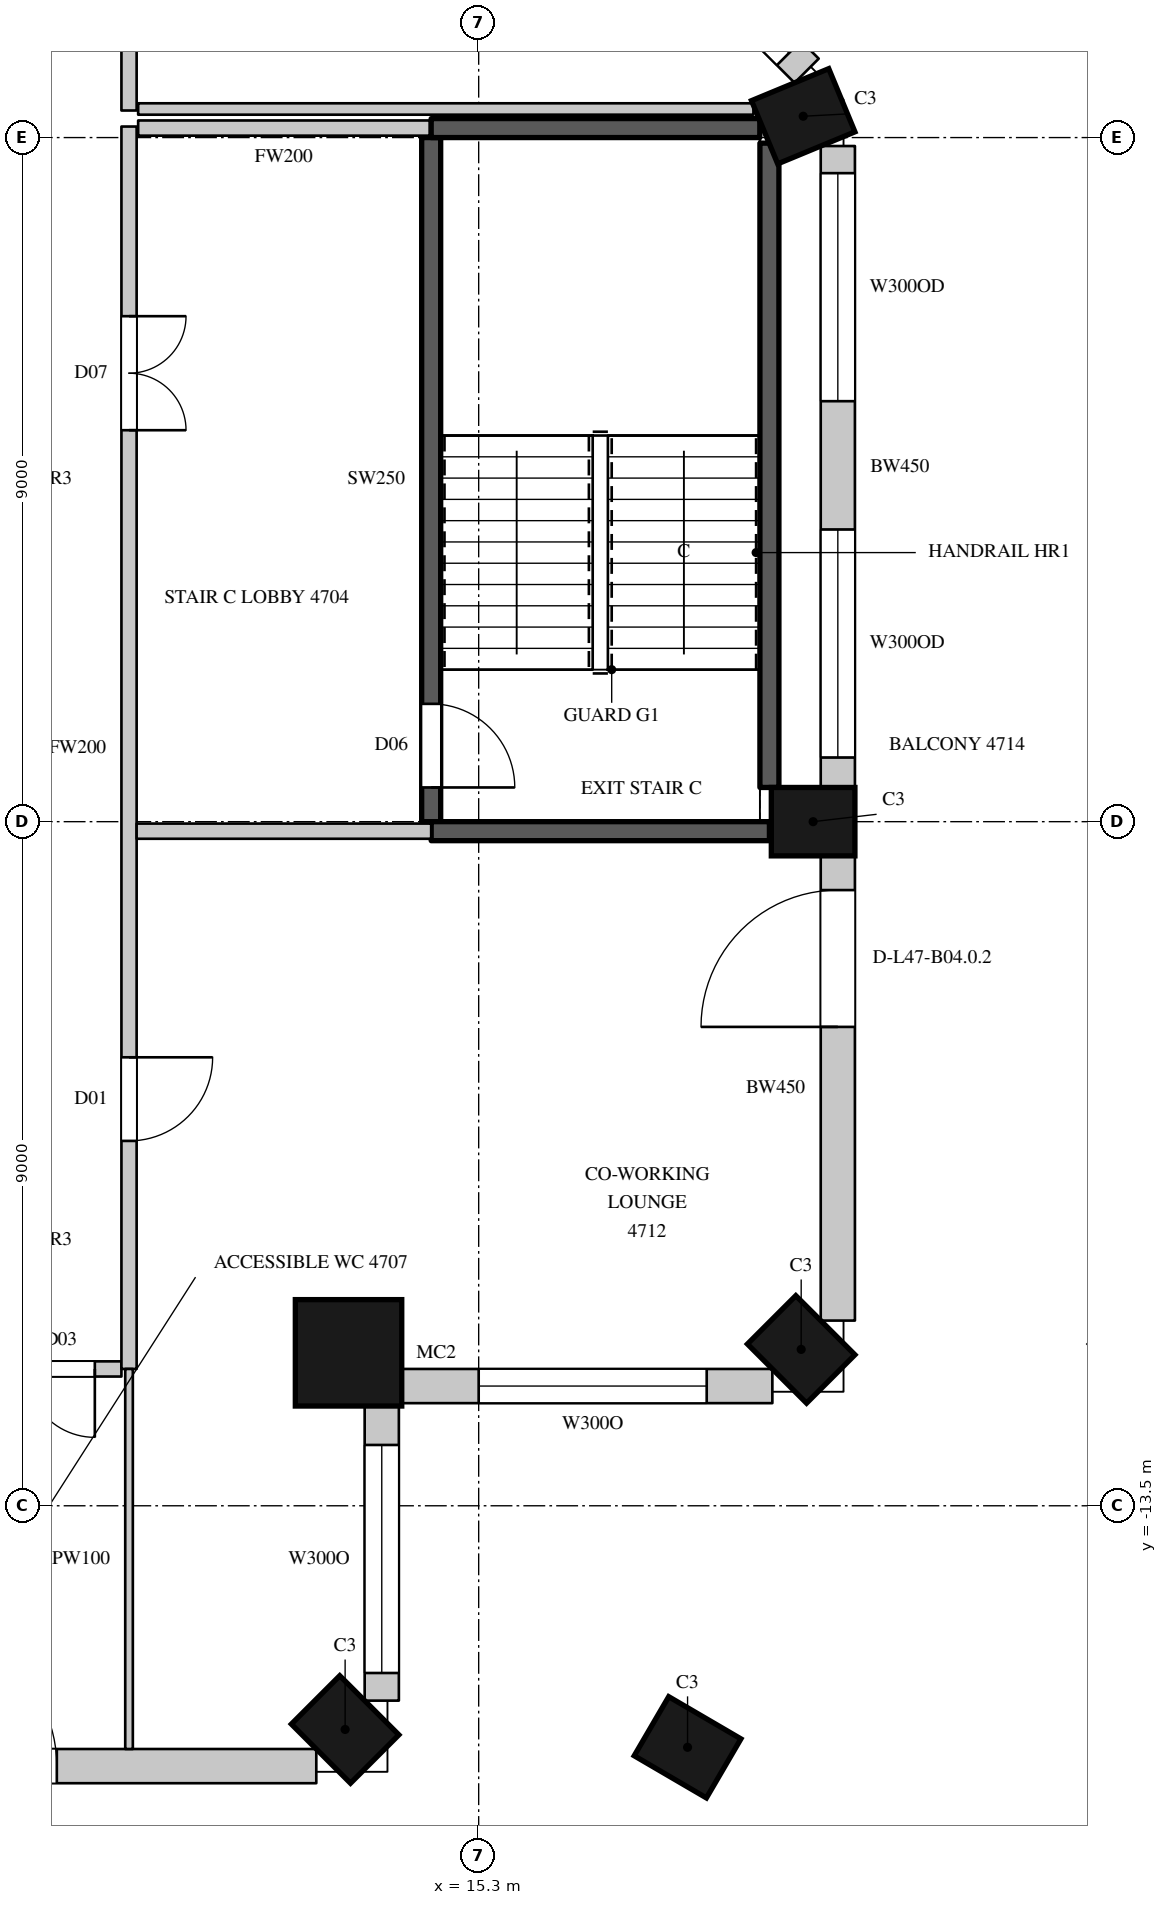
"""IFC4 building model, lengths in metres.
Left out: names, types, materials, properties, quantities, classifications, styles, units other than length and angle.
Written with IfcOpenShell. Run it as: python <this file> out.ifc"""

import sys

from ifc_helpers import new_model, si_unit, direction, frame, frame_2d, origin, origin_2d, place, context, subcontext, project, spatial, rectangle, circle, extrude, element, fill, save


model = new_model("IFC4")
c1 = context("Model", 3, precision=1e-05, world=origin(), true_north=direction((0.0, 1.0)))
c2 = subcontext(c1, "Body", "Model", "MODEL_VIEW")
j1 = project(units=[si_unit("LENGTHUNIT", "METRE"), si_unit("PLANEANGLEUNIT", "RADIAN")], contexts=[c1])
p1 = place(None, origin())
s1 = spatial("IfcSite", under=j1, at=p1, CompositionType="ELEMENT")
p2 = place(p1, origin())
s2 = spatial("IfcBuilding", under=s1, at=p2, CompositionType="ELEMENT")
p3 = place(p2, frame((0.0, 0.0, 213.8)))
s3 = spatial("IfcBuildingStorey", under=s2, at=p3, CompositionType="ELEMENT", Elevation=213.8)
p4 = place(p3, frame((13.543, -16.443, 0.0), z_axis=(0.0, 0.0, 1.0), x_axis=(0.707106781187, 0.707106781187, 0.0)))
e1 = element("IfcColumn", 1, at=p4, inside=s3, PredefinedType="COLUMN", context=c2, shape_type="SweptSolid", body=[
    extrude(rectangle(XDim=0.9, YDim=1.1, at=origin_2d()), origin(), (0.0, 0.0, 1.0), 4.1),
])
p5 = place(p3, frame((13.588, -11.488, 0.0), z_axis=(0.0, 0.0, 1.0), x_axis=(1.0, 0.0, 0.0)))
e2 = element("IfcColumn", 2, at=p5, inside=s3, PredefinedType="COLUMN", context=c2, shape_type="SweptSolid", body=[
    extrude(circle(Radius=0.7, at=origin_2d()), origin(), (0.0, 0.0, 1.0), 4.1),
])
for number, where, z_axis, x_axis in (
    (3, (19.543, -11.443, 0.0), (0.0, 0.0, 1.0), (0.707, 0.707, 0.0)),
    (4, (19.7, -4.5, 0.0), (0.0, 0.0, 1.0), (0.0, 1.0, 0.0)),
    (5, (19.57, 4.78, 0.0), (0.0, 0.0, 1.0), (-0.383, 0.924, 0.0)),
    (6, (18.048, -16.677, 0.0), (0.0, 0.0, 1.0), (0.504, 0.863, 0.0)),
):
    element("IfcColumn", number, at=place(p3, frame(where, z_axis=z_axis, x_axis=x_axis)), inside=s3, PredefinedType="COLUMN", context=c2, shape_type="SweptSolid", body=[
        extrude(rectangle(XDim=0.9, YDim=1.1, at=origin_2d()), origin(), (0.0, 0.0, 1.0), 4.1),
    ])
p6 = place(p3, frame((6.75, -16.925, 0.0), z_axis=(0.0, 0.0, 1.0), x_axis=(1.0, 0.0, 0.0)))
e7 = element("IfcWall", 7, at=p6, inside=s3, PredefinedType="SOLIDWALL", context=c2, shape_type="SweptSolid", body=[
    extrude(rectangle(XDim=6.414, YDim=0.45, at=frame_2d((3.207, 0.0))), origin(), (0.0, 0.0, 1.0), 3.8),
])
p7 = place(p6, frame((1.2, 0.0, 0.0)))
e8 = element("IfcOpeningElement", 8, at=p7, cuts=e7, PredefinedType="OPENING", context=c2, shape_type="SweptSolid", body=[
    extrude(rectangle(XDim=1.8, YDim=2.4, at=frame_2d((0.9, 1.2))), frame((0.0, 0.235, 0.0), z_axis=(0.0, -1.0, 0.0), x_axis=(1.0, 0.0, 0.0)), (0.0, 0.0, 1.0), 0.47),
])
p8 = place(p3, frame((14.025, -16.064, 0.0), z_axis=(0.0, 0.0, 1.0), x_axis=(0.0, 1.0, 0.0)))
e9 = element("IfcWall", 9, at=p8, inside=s3, PredefinedType="SOLIDWALL", context=c2, shape_type="SweptSolid", body=[
    extrude(rectangle(XDim=3.909, YDim=0.45, at=frame_2d((1.955, 0.0))), origin(), (0.0, 0.0, 1.0), 3.8),
])
p9 = place(p8, frame((0.364, 0.0, 1.05)))
e10 = element("IfcOpeningElement", 10, at=p9, cuts=e9, PredefinedType="OPENING", context=c2, shape_type="SweptSolid", body=[
    extrude(rectangle(XDim=3.0, YDim=2.4, at=frame_2d((1.5, 1.2))), frame((0.0, 0.235, 0.0), z_axis=(0.0, -1.0, 0.0), x_axis=(1.0, 0.0, 0.0)), (0.0, 0.0, 1.0), 0.47),
])
p10 = place(p3, frame((14.255, -11.925, 0.0), z_axis=(0.0, 0.0, 1.0), x_axis=(1.0, 0.0, 0.0)))
e11 = element("IfcWall", 11, at=p10, inside=s3, PredefinedType="SOLIDWALL", context=c2, shape_type="SweptSolid", body=[
    extrude(rectangle(XDim=4.909, YDim=0.45, at=frame_2d((2.455, 0.0))), origin(), (0.0, 0.0, 1.0), 3.8),
])
p11 = place(p10, frame((1.045, 0.0, 1.05)))
e12 = element("IfcOpeningElement", 12, at=p11, cuts=e11, PredefinedType="OPENING", context=c2, shape_type="SweptSolid", body=[
    extrude(rectangle(XDim=3.0, YDim=2.4, at=frame_2d((1.5, 1.2))), frame((0.0, 0.235, 0.0), z_axis=(0.0, -1.0, 0.0), x_axis=(1.0, 0.0, 0.0)), (0.0, 0.0, 1.0), 0.47),
])
p12 = place(p3, frame((20.025, -11.064, 0.0), z_axis=(0.0, 0.0, 1.0), x_axis=(0.0, 1.0, 0.0)))
e13 = element("IfcWall", 13, at=p12, inside=s3, PredefinedType="SOLIDWALL", context=c2, shape_type="SweptSolid", body=[
    extrude(rectangle(XDim=6.114, YDim=0.45, at=frame_2d((3.057, 0.0))), origin(), (0.0, 0.0, 1.0), 3.8),
])
p13 = place(p12, frame((3.864, 0.0, 0.0)))
e14 = element("IfcOpeningElement", 14, at=p13, cuts=e13, PredefinedType="OPENING", context=c2, shape_type="SweptSolid", body=[
    extrude(rectangle(XDim=1.8, YDim=2.4, at=frame_2d((0.9, 1.2))), frame((0.0, 0.235, 0.0), z_axis=(0.0, -1.0, 0.0), x_axis=(1.0, 0.0, 0.0)), (0.0, 0.0, 1.0), 0.47),
])
p14 = place(p3, frame((20.025, -4.05, 0.0), z_axis=(0.0, 0.0, 1.0), x_axis=(0.0, 1.0, 0.0)))
e15 = element("IfcWall", 15, at=p14, inside=s3, PredefinedType="SOLIDWALL", context=c2, shape_type="SweptSolid", body=[
    extrude(rectangle(XDim=8.439, YDim=0.45, at=frame_2d((4.219, 0.0))), origin(), (0.0, 0.0, 1.0), 3.8),
])
p15 = place(p14, frame((0.394, 0.0, 1.05)))
e16 = element("IfcOpeningElement", 16, at=p15, cuts=e15, PredefinedType="OPENING", context=c2, shape_type="SweptSolid", body=[
    extrude(rectangle(XDim=3.0, YDim=2.4, at=frame_2d((1.5, 1.2))), frame((0.0, 0.235, 0.0), z_axis=(0.0, -1.0, 0.0), x_axis=(1.0, 0.0, 0.0)), (0.0, 0.0, 1.0), 0.47),
])
p16 = place(p14, frame((5.082, 0.0, 1.05)))
e17 = element("IfcOpeningElement", 17, at=p16, cuts=e15, PredefinedType="OPENING", context=c2, shape_type="SweptSolid", body=[
    extrude(rectangle(XDim=3.0, YDim=2.4, at=frame_2d((1.5, 1.2))), frame((0.0, 0.235, 0.0), z_axis=(0.0, -1.0, 0.0), x_axis=(1.0, 0.0, 0.0)), (0.0, 0.0, 1.0), 0.47),
])
p17 = place(p3, frame((19.615, 5.379, 0.0), z_axis=(0.0, 0.0, 1.0), x_axis=(-0.707089646058, 0.7071239159, 0.0)))
e18 = element("IfcWall", 18, at=p17, inside=s3, PredefinedType="SOLIDWALL", context=c2, shape_type="SweptSolid", body=[
    extrude(rectangle(XDim=7.124, YDim=0.45, at=frame_2d((3.562, 0.0))), origin(), (0.0, 0.0, 1.0), 3.8),
])
p18 = place(p17, frame((0.328, 0.0, 1.05)))
e19 = element("IfcOpeningElement", 19, at=p18, cuts=e18, PredefinedType="OPENING", context=c2, shape_type="SweptSolid", body=[
    extrude(rectangle(XDim=2.4, YDim=2.4, at=frame_2d((1.2, 1.2))), frame((0.0, 0.235, 0.0), z_axis=(0.0, -1.0, 0.0), x_axis=(1.0, 0.0, 0.0)), (0.0, 0.0, 1.0), 0.47),
])
p19 = place(p17, frame((4.359, 0.0, 1.05)))
e20 = element("IfcOpeningElement", 20, at=p19, cuts=e18, PredefinedType="OPENING", context=c2, shape_type="SweptSolid", body=[
    extrude(rectangle(XDim=2.4, YDim=2.4, at=frame_2d((1.2, 1.2))), frame((0.0, 0.235, 0.0), z_axis=(0.0, -1.0, 0.0), x_axis=(1.0, 0.0, 0.0)), (0.0, 0.0, 1.0), 0.47),
])
p20 = place(p3, frame((21.1, -5.1, 0.0), z_axis=(0.0, 0.0, 1.0), x_axis=(0.0, 1.0, 0.0)))
e21 = element("IfcWall", 21, at=p20, inside=s3, PredefinedType="SOLIDWALL", context=c2, shape_type="SweptSolid", body=[
    extrude(rectangle(XDim=3.583, YDim=0.45, at=frame_2d((1.792, 0.0))), origin(), (0.0, 0.0, 1.0), 0.6),
])
p21 = place(p3, frame((-10.9, -11.7, 0.0), z_axis=(0.0, 0.0, 1.0), x_axis=(1.0, 0.0, 0.0)))
e22 = element("IfcWall", 22, at=p21, inside=s3, PredefinedType="PARTITIONING", context=c2, shape_type="SweptSolid", body=[
    extrude(rectangle(XDim=21.5, YDim=0.2, at=frame_2d((10.75, 0.0))), origin(), (0.0, 0.0, 1.0), 3.8),
])
p22 = place(p21, frame((13.2, 0.0, 0.0)))
e23 = element("IfcOpeningElement", 23, at=p22, cuts=e22, PredefinedType="OPENING", context=c2, shape_type="SweptSolid", body=[
    extrude(rectangle(XDim=0.9, YDim=2.2, at=frame_2d((0.45, 1.1))), frame((0.0, 0.11, 0.0), z_axis=(0.0, -1.0, 0.0), x_axis=(1.0, 0.0, 0.0)), (0.0, 0.0, 1.0), 0.22),
])
p23 = place(p21, frame((16.5, 0.0, 0.0)))
e24 = element("IfcOpeningElement", 24, at=p23, cuts=e22, PredefinedType="OPENING", context=c2, shape_type="SweptSolid", body=[
    extrude(rectangle(XDim=0.9, YDim=2.2, at=frame_2d((0.45, 1.1))), frame((0.0, 0.11, 0.0), z_axis=(0.0, -1.0, 0.0), x_axis=(1.0, 0.0, 0.0)), (0.0, 0.0, 1.0), 0.22),
])
p24 = place(p21, frame((20.25, 0.0, 0.0)))
e25 = element("IfcOpeningElement", 25, at=p24, cuts=e22, PredefinedType="OPENING", context=c2, shape_type="SweptSolid", body=[
    extrude(rectangle(XDim=0.9, YDim=2.2, at=frame_2d((0.45, 1.1))), frame((0.0, 0.11, 0.0), z_axis=(0.0, -1.0, 0.0), x_axis=(1.0, 0.0, 0.0)), (0.0, 0.0, 1.0), 0.22),
])
p25 = place(p21, frame((1.25, 0.0, 0.0)))
e26 = element("IfcOpeningElement", 26, at=p25, cuts=e22, PredefinedType="OPENING", context=c2, shape_type="SweptSolid", body=[
    extrude(rectangle(XDim=1.1, YDim=2.4, at=frame_2d((0.55, 1.2))), frame((0.0, 0.11, 0.0), z_axis=(0.0, -1.0, 0.0), x_axis=(1.0, 0.0, 0.0)), (0.0, 0.0, 1.0), 0.22),
])
p26 = place(p21, frame((7.3, 0.0, 0.0)))
e27 = element("IfcOpeningElement", 27, at=p26, cuts=e22, PredefinedType="OPENING", context=c2, shape_type="SweptSolid", body=[
    extrude(rectangle(XDim=1.1, YDim=2.4, at=frame_2d((0.55, 1.2))), frame((0.0, 0.11, 0.0), z_axis=(0.0, -1.0, 0.0), x_axis=(1.0, 0.0, 0.0)), (0.0, 0.0, 1.0), 0.22),
])
p27 = place(p3, frame((10.7, -11.7, 0.0), z_axis=(0.0, 0.0, 1.0), x_axis=(0.0, 1.0, 0.0)))
e28 = element("IfcWall", 28, at=p27, inside=s3, PredefinedType="PARTITIONING", context=c2, shape_type="SweptSolid", body=[
    extrude(rectangle(XDim=16.345, YDim=0.2, at=frame_2d((8.172, 0.0))), origin(), (0.0, 0.0, 1.0), 3.8),
])
p28 = place(p27, frame((12.35, 0.0, 0.0)))
e29 = element("IfcOpeningElement", 29, at=p28, cuts=e28, PredefinedType="OPENING", context=c2, shape_type="SweptSolid", body=[
    extrude(rectangle(XDim=1.5, YDim=2.4, at=frame_2d((0.75, 1.2))), frame((0.0, 0.11, 0.0), z_axis=(0.0, -1.0, 0.0), x_axis=(1.0, 0.0, 0.0)), (0.0, 0.0, 1.0), 0.22),
])
p29 = place(p27, frame((3.0, 0.0, 0.0)))
e30 = element("IfcOpeningElement", 30, at=p29, cuts=e28, PredefinedType="OPENING", context=c2, shape_type="SweptSolid", body=[
    extrude(rectangle(XDim=1.1, YDim=2.4, at=frame_2d((0.55, 1.2))), frame((0.0, 0.11, 0.0), z_axis=(0.0, -1.0, 0.0), x_axis=(1.0, 0.0, 0.0)), (0.0, 0.0, 1.0), 0.22),
])
p30 = place(p3, frame((10.8, -4.625, 0.0), z_axis=(0.0, 0.0, 1.0), x_axis=(1.0, 0.0, 0.0)))
e31 = element("IfcWall", 31, at=p30, inside=s3, PredefinedType="PARTITIONING", context=c2, shape_type="SweptSolid", body=[
    extrude(rectangle(XDim=3.875, YDim=0.2, at=frame_2d((1.938, 0.0))), origin(), (0.0, 0.0, 1.0), 3.8),
])
p31 = place(p3, frame((10.7, 4.856, 0.0), z_axis=(0.0, 0.0, 1.0), x_axis=(0.0, 1.0, 0.0)))
e32 = element("IfcWall", 32, at=p31, inside=s3, PredefinedType="PARTITIONING", context=c2, shape_type="SweptSolid", body=[
    extrude(rectangle(XDim=7.244, YDim=0.2, at=frame_2d((3.622, 0.0))), origin(), (0.0, 0.0, 1.0), 3.8),
])
p32 = place(p31, frame((3.1, 0.0, 0.0)))
e33 = element("IfcOpeningElement", 33, at=p32, cuts=e32, PredefinedType="OPENING", context=c2, shape_type="SweptSolid", body=[
    extrude(rectangle(XDim=1.1, YDim=2.4, at=frame_2d((0.55, 1.2))), frame((0.0, 0.11, 0.0), z_axis=(0.0, -1.0, 0.0), x_axis=(1.0, 0.0, 0.0)), (0.0, 0.0, 1.0), 0.22),
])
p33 = place(p3, frame((10.82, 4.625, 0.0), z_axis=(0.0, 0.0, 1.0), x_axis=(1.0, 0.0, 0.0)))
e34 = element("IfcWall", 34, at=p33, inside=s3, PredefinedType="PARTITIONING", context=c2, shape_type="SweptSolid", body=[
    extrude(rectangle(XDim=3.835, YDim=0.2, at=frame_2d((1.917, 0.0))), origin(), (0.0, 0.0, 1.0), 3.8),
])
p34 = place(p3, frame((10.82, 4.876, 0.0), z_axis=(0.0, 0.0, 1.0), x_axis=(1.0, 0.0, 0.0)))
e35 = element("IfcWall", 35, at=p34, inside=s3, PredefinedType="PARTITIONING", context=c2, shape_type="SweptSolid", body=[
    extrude(rectangle(XDim=8.095, YDim=0.15, at=frame_2d((4.047, 0.0))), origin(), (0.0, 0.0, 1.0), 3.8),
])
p35 = place(p3, frame((14.675, -4.5, 0.0), z_axis=(0.0, 0.0, 1.0), x_axis=(0.0, 1.0, 0.0)))
e36 = element("IfcWall", 36, at=p35, inside=s3, PredefinedType="SHEAR", context=c2, shape_type="SweptSolid", body=[
    extrude(rectangle(XDim=9.0, YDim=0.25, at=frame_2d((4.5, 0.0))), origin(), (0.0, 0.0, 1.0), 3.8),
])
p36 = place(p35, frame((0.45, 0.0, 0.0)))
e37 = element("IfcOpeningElement", 37, at=p36, cuts=e36, PredefinedType="OPENING", context=c2, shape_type="SweptSolid", body=[
    extrude(rectangle(XDim=1.1, YDim=2.2, at=frame_2d((0.55, 1.1))), frame((0.0, 0.135, 0.0), z_axis=(0.0, -1.0, 0.0), x_axis=(1.0, 0.0, 0.0)), (0.0, 0.0, 1.0), 0.27),
])
p37 = place(p3, frame((14.675, -4.625, 0.0), z_axis=(0.0, 0.0, 1.0), x_axis=(1.0, 0.0, 0.0)))
e38 = element("IfcWall", 38, at=p37, inside=s3, PredefinedType="SHEAR", context=c2, shape_type="SweptSolid", body=[
    extrude(rectangle(XDim=4.45, YDim=0.25, at=frame_2d((2.225, 0.0))), origin(), (0.0, 0.0, 1.0), 3.8),
])
p38 = place(p3, frame((14.675, 4.625, 0.0), z_axis=(0.0, 0.0, 1.0), x_axis=(1.0, 0.0, 0.0)))
e39 = element("IfcWall", 39, at=p38, inside=s3, PredefinedType="SHEAR", context=c2, shape_type="SweptSolid", body=[
    extrude(rectangle(XDim=4.324, YDim=0.25, at=frame_2d((2.162, 0.0))), origin(), (0.0, 0.0, 1.0), 3.8),
])
p39 = place(p3, frame((19.125, -4.05, 0.0), z_axis=(0.0, 0.0, 1.0), x_axis=(0.0, 1.0, 0.0)))
e40 = element("IfcWall", 40, at=p39, inside=s3, PredefinedType="SHEAR", context=c2, shape_type="SweptSolid", body=[
    extrude(rectangle(XDim=8.477, YDim=0.25, at=frame_2d((4.238, 0.0))), origin(), (0.0, 0.0, 1.0), 3.8),
])
p40 = place(p3, frame((10.7, -16.7, 0.0), z_axis=(0.0, 0.0, 1.0), x_axis=(0.0, 1.0, 0.0)))
e41 = element("IfcWall", 41, at=p40, inside=s3, PredefinedType="PARTITIONING", context=c2, shape_type="SweptSolid", body=[
    extrude(rectangle(XDim=5.0, YDim=0.1, at=frame_2d((2.5, 0.0))), origin(), (0.0, 0.0, 1.0), 3.8),
])
p41 = place(p7, origin())
e42 = element("IfcDoor", 42, at=p41, inside=s3, OperationType="SLIDING_TO_LEFT", PredefinedType="DOOR", context=c2, shape_type="SweptSolid", body=[
    extrude(rectangle(XDim=1.8, YDim=2.4, at=frame_2d((0.9, 1.2))), frame((0.0, 0.13, 0.0), z_axis=(0.0, -1.0, 0.0), x_axis=(1.0, 0.0, 0.0)), (0.0, 0.0, 1.0), 0.05),
])
fill(e8, e42)
p42 = place(p9, origin())
e43 = element("IfcWindow", 43, at=p42, inside=s3, PartitioningType="SINGLE_PANEL", PredefinedType="WINDOW", context=c2, shape_type="SweptSolid", body=[
    extrude(rectangle(XDim=3.0, YDim=2.4, at=frame_2d((1.5, 1.2))), frame((0.0, 0.135, 0.0), z_axis=(0.0, -1.0, 0.0), x_axis=(1.0, 0.0, 0.0)), (0.0, 0.0, 1.0), 0.06),
])
fill(e10, e43)
p43 = place(p11, origin())
e44 = element("IfcWindow", 44, at=p43, inside=s3, PartitioningType="SINGLE_PANEL", PredefinedType="WINDOW", context=c2, shape_type="SweptSolid", body=[
    extrude(rectangle(XDim=3.0, YDim=2.4, at=frame_2d((1.5, 1.2))), frame((0.0, 0.135, 0.0), z_axis=(0.0, -1.0, 0.0), x_axis=(1.0, 0.0, 0.0)), (0.0, 0.0, 1.0), 0.06),
])
fill(e12, e44)
p44 = place(p13, origin())
e45 = element("IfcDoor", 45, at=p44, inside=s3, OperationType="SLIDING_TO_LEFT", PredefinedType="DOOR", context=c2, shape_type="SweptSolid", body=[
    extrude(rectangle(XDim=1.8, YDim=2.4, at=frame_2d((0.9, 1.2))), frame((0.0, 0.13, 0.0), z_axis=(0.0, -1.0, 0.0), x_axis=(1.0, 0.0, 0.0)), (0.0, 0.0, 1.0), 0.05),
])
fill(e14, e45)
p45 = place(p15, origin())
e46 = element("IfcWindow", 46, at=p45, inside=s3, PartitioningType="SINGLE_PANEL", PredefinedType="WINDOW", context=c2, shape_type="SweptSolid", body=[
    extrude(rectangle(XDim=3.0, YDim=2.4, at=frame_2d((1.5, 1.2))), frame((0.0, 0.135, 0.0), z_axis=(0.0, -1.0, 0.0), x_axis=(1.0, 0.0, 0.0)), (0.0, 0.0, 1.0), 0.06),
])
fill(e16, e46)
p46 = place(p16, origin())
e47 = element("IfcWindow", 47, at=p46, inside=s3, PartitioningType="SINGLE_PANEL", PredefinedType="WINDOW", context=c2, shape_type="SweptSolid", body=[
    extrude(rectangle(XDim=3.0, YDim=2.4, at=frame_2d((1.5, 1.2))), frame((0.0, 0.135, 0.0), z_axis=(0.0, -1.0, 0.0), x_axis=(1.0, 0.0, 0.0)), (0.0, 0.0, 1.0), 0.06),
])
fill(e17, e47)
p47 = place(p18, origin())
e48 = element("IfcWindow", 48, at=p47, inside=s3, PartitioningType="SINGLE_PANEL", PredefinedType="WINDOW", context=c2, shape_type="SweptSolid", body=[
    extrude(rectangle(XDim=2.4, YDim=2.4, at=frame_2d((1.2, 1.2))), frame((0.0, 0.135, 0.0), z_axis=(0.0, -1.0, 0.0), x_axis=(1.0, 0.0, 0.0)), (0.0, 0.0, 1.0), 0.06),
])
fill(e19, e48)
p48 = place(p28, origin())
e49 = element("IfcDoor", 49, at=p48, inside=s3, OperationType="DOUBLE_DOOR_SINGLE_SWING", PredefinedType="DOOR", context=c2, shape_type="SweptSolid", body=[
    extrude(rectangle(XDim=1.5, YDim=2.4, at=frame_2d((0.75, 1.2))), frame((0.0, 0.025, 0.0), z_axis=(0.0, -1.0, 0.0), x_axis=(1.0, 0.0, 0.0)), (0.0, 0.0, 1.0), 0.05),
])
fill(e29, e49)
p49 = place(p24, origin())
e50 = element("IfcDoor", 50, at=p49, inside=s3, OperationType="SINGLE_SWING_LEFT", PredefinedType="DOOR", context=c2, shape_type="SweptSolid", body=[
    extrude(rectangle(XDim=0.9, YDim=2.2, at=frame_2d((0.45, 1.1))), frame((0.0, 0.025, 0.0), z_axis=(0.0, -1.0, 0.0), x_axis=(1.0, 0.0, 0.0)), (0.0, 0.0, 1.0), 0.05),
])
fill(e25, e50)
p50 = place(p29, origin())
e51 = element("IfcDoor", 51, at=p50, inside=s3, OperationType="SINGLE_SWING_LEFT", PredefinedType="DOOR", context=c2, shape_type="SweptSolid", body=[
    extrude(rectangle(XDim=1.1, YDim=2.4, at=frame_2d((0.55, 1.2))), frame((0.0, 0.025, 0.0), z_axis=(0.0, -1.0, 0.0), x_axis=(1.0, 0.0, 0.0)), (0.0, 0.0, 1.0), 0.05),
])
fill(e30, e51)
p51 = place(p36, origin())
e52 = element("IfcDoor", 52, at=p51, inside=s3, OperationType="SINGLE_SWING_RIGHT", PredefinedType="DOOR", context=c2, shape_type="SweptSolid", body=[
    extrude(rectangle(XDim=1.1, YDim=2.2, at=frame_2d((0.55, 1.1))), frame((0.0, 0.025, 0.0), z_axis=(0.0, -1.0, 0.0), x_axis=(1.0, 0.0, 0.0)), (0.0, 0.0, 1.0), 0.05),
])
fill(e37, e52)
save(model, sys.argv[1])
